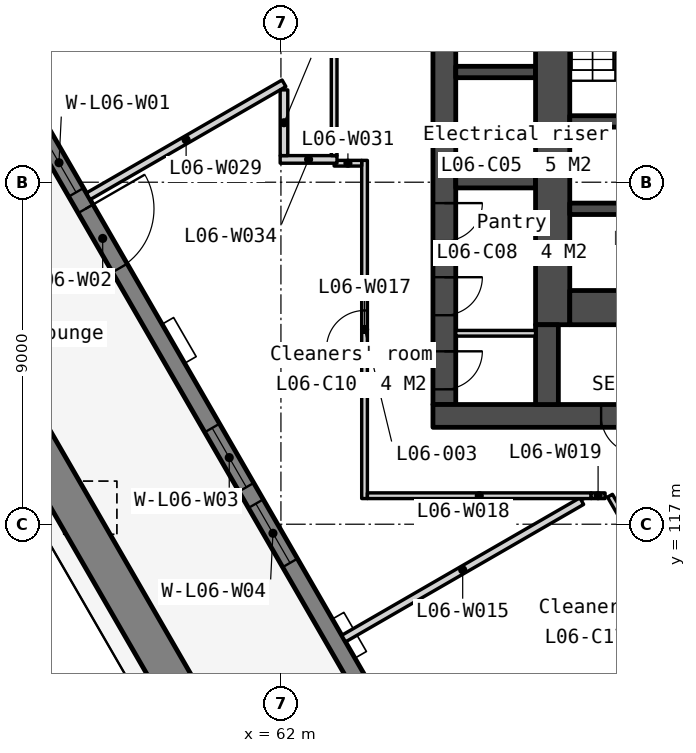
"""IFC4 building model, lengths in metres.
Left out: names, types, materials, properties, quantities, classifications, styles, units other than length and angle.
Written with IfcOpenShell. Run it as: python <this file> out.ifc"""

import sys

from ifc_helpers import new_model, si_unit, direction, frame, frame_2d, origin, place, context, subcontext, project, spatial, polyline, rectangle, outline, extrude, element, fill, save


model = new_model("IFC4")
c1 = context("Model", 3, precision=1e-05, world=origin(), true_north=direction((0.0, 1.0)))
c2 = subcontext(c1, "Body", "Model", "MODEL_VIEW")
j1 = project(units=[si_unit("LENGTHUNIT", "METRE"), si_unit("PLANEANGLEUNIT", "RADIAN")], contexts=[c1])
p1 = place(None, origin())
s1 = spatial("IfcSite", under=j1, at=p1, CompositionType="ELEMENT")
p2 = place(p1, origin())
s2 = spatial("IfcBuilding", under=s1, at=p2, CompositionType="ELEMENT")
p3 = place(p2, frame((0.0, 0.0, 35.0)))
s3 = spatial("IfcBuildingStorey", under=s2, at=p3, CompositionType="ELEMENT", Elevation=35.0)
p4 = place(p3, frame((66.3, 133.95, 0.0), z_axis=(0.0, 0.0, 1.0), x_axis=(0.0, -1.0, 0.0)))
e1 = element("IfcWall", 1, at=p4, inside=s3, PredefinedType="SOLIDWALL", context=c2, shape_type="SweptSolid", body=[
    extrude(rectangle(XDim=13.8, YDim=0.6, at=frame_2d((6.9, 0.0))), origin(), (0.0, 0.0, 1.0), 3.35),
])
p5 = place(p4, frame((0.6, 0.0, 0.0)))
e2 = element("IfcOpeningElement", 2, at=p5, cuts=e1, PredefinedType="OPENING", context=c2, shape_type="SweptSolid", body=[
    extrude(rectangle(XDim=1.1, YDim=2.1, at=frame_2d((0.55, 1.05))), frame((0.0, 0.31, 0.0), z_axis=(0.0, -1.0, 0.0), x_axis=(1.0, 0.0, 0.0)), (0.0, 0.0, 1.0), 0.62),
])
p6 = place(p4, frame((12.4, 0.0, 0.0)))
e3 = element("IfcOpeningElement", 3, at=p6, cuts=e1, PredefinedType="OPENING", context=c2, shape_type="SweptSolid", body=[
    extrude(rectangle(XDim=1.0, YDim=2.1, at=frame_2d((0.5, 1.05))), frame((0.0, 0.31, 0.0), z_axis=(0.0, -1.0, 0.0), x_axis=(1.0, 0.0, 0.0)), (0.0, 0.0, 1.0), 0.62),
])
p7 = place(p4, frame((8.5, 0.0, 0.0)))
e4 = element("IfcOpeningElement", 4, at=p7, cuts=e1, PredefinedType="OPENING", context=c2, shape_type="SweptSolid", body=[
    extrude(rectangle(XDim=1.0, YDim=2.1, at=frame_2d((0.5, 1.05))), frame((0.0, 0.31, 0.0), z_axis=(0.0, -1.0, 0.0), x_axis=(1.0, 0.0, 0.0)), (0.0, 0.0, 1.0), 0.62),
])
p8 = place(p4, frame((10.45, 0.0, 0.0)))
e5 = element("IfcOpeningElement", 5, at=p8, cuts=e1, PredefinedType="OPENING", context=c2, shape_type="SweptSolid", body=[
    extrude(rectangle(XDim=1.0, YDim=2.1, at=frame_2d((0.5, 1.05))), frame((0.0, 0.31, 0.0), z_axis=(0.0, -1.0, 0.0), x_axis=(1.0, 0.0, 0.0)), (0.0, 0.0, 1.0), 0.62),
])
p9 = place(p3, frame((66.0, 119.85, 0.0), z_axis=(0.0, 0.0, 1.0), x_axis=(1.0, 0.0, 0.0)))
e6 = element("IfcWall", 6, at=p9, inside=s3, PredefinedType="SOLIDWALL", context=c2, shape_type="SweptSolid", body=[
    extrude(rectangle(XDim=28.0, YDim=0.6, at=frame_2d((14.0, 0.0))), origin(), (0.0, 0.0, 1.0), 3.35),
])
p10 = place(p9, frame((6.825, 0.0, 0.0)))
e7 = element("IfcOpeningElement", 7, at=p10, cuts=e6, PredefinedType="OPENING", context=c2, shape_type="SweptSolid", body=[
    extrude(rectangle(XDim=1.8, YDim=2.1, at=frame_2d((0.9, 1.05))), frame((0.0, 0.31, 0.0), z_axis=(0.0, -1.0, 0.0), x_axis=(1.0, 0.0, 0.0)), (0.0, 0.0, 1.0), 0.62),
])
p11 = place(p9, frame((15.85, 0.0, 0.0)))
e8 = element("IfcOpeningElement", 8, at=p11, cuts=e6, PredefinedType="OPENING", context=c2, shape_type="SweptSolid", body=[
    extrude(rectangle(XDim=1.5, YDim=2.1, at=frame_2d((0.75, 1.05))), frame((0.0, 0.31, 0.0), z_axis=(0.0, -1.0, 0.0), x_axis=(1.0, 0.0, 0.0)), (0.0, 0.0, 1.0), 0.62),
])
p12 = place(p9, frame((19.375, 0.0, 0.0)))
e9 = element("IfcOpeningElement", 9, at=p12, cuts=e6, PredefinedType="OPENING", context=c2, shape_type="SweptSolid", body=[
    extrude(rectangle(XDim=1.8, YDim=2.1, at=frame_2d((0.9, 1.05))), frame((0.0, 0.31, 0.0), z_axis=(0.0, -1.0, 0.0), x_axis=(1.0, 0.0, 0.0)), (0.0, 0.0, 1.0), 0.62),
])
p13 = place(p9, frame((4.425, 0.0, 0.0)))
e10 = element("IfcOpeningElement", 10, at=p13, cuts=e6, PredefinedType="OPENING", context=c2, shape_type="SweptSolid", body=[
    extrude(rectangle(XDim=1.0, YDim=2.1, at=frame_2d((0.5, 1.05))), frame((0.0, 0.31, 0.0), z_axis=(0.0, -1.0, 0.0), x_axis=(1.0, 0.0, 0.0)), (0.0, 0.0, 1.0), 0.62),
])
p14 = place(p9, frame((9.925, 0.0, 0.0)))
e11 = element("IfcOpeningElement", 11, at=p14, cuts=e6, PredefinedType="OPENING", context=c2, shape_type="SweptSolid", body=[
    extrude(rectangle(XDim=1.0, YDim=2.1, at=frame_2d((0.5, 1.05))), frame((0.0, 0.31, 0.0), z_axis=(0.0, -1.0, 0.0), x_axis=(1.0, 0.0, 0.0)), (0.0, 0.0, 1.0), 0.62),
])
p15 = place(p9, frame((13.125, 0.0, 0.0)))
e12 = element("IfcOpeningElement", 12, at=p15, cuts=e6, PredefinedType="OPENING", context=c2, shape_type="SweptSolid", body=[
    extrude(rectangle(XDim=1.0, YDim=2.1, at=frame_2d((0.5, 1.05))), frame((0.0, 0.31, 0.0), z_axis=(0.0, -1.0, 0.0), x_axis=(1.0, 0.0, 0.0)), (0.0, 0.0, 1.0), 0.62),
])
p16 = place(p9, frame((21.725, 0.0, 0.0)))
e13 = element("IfcOpeningElement", 13, at=p16, cuts=e6, PredefinedType="OPENING", context=c2, shape_type="SweptSolid", body=[
    extrude(rectangle(XDim=1.0, YDim=2.1, at=frame_2d((0.5, 1.05))), frame((0.0, 0.31, 0.0), z_axis=(0.0, -1.0, 0.0), x_axis=(1.0, 0.0, 0.0)), (0.0, 0.0, 1.0), 0.62),
])
p17 = place(p9, frame((23.425, 0.0, 0.0)))
e14 = element("IfcOpeningElement", 14, at=p17, cuts=e6, PredefinedType="OPENING", context=c2, shape_type="SweptSolid", body=[
    extrude(rectangle(XDim=1.0, YDim=2.1, at=frame_2d((0.5, 1.05))), frame((0.0, 0.31, 0.0), z_axis=(0.0, -1.0, 0.0), x_axis=(1.0, 0.0, 0.0)), (0.0, 0.0, 1.0), 0.62),
])
p18 = place(p3, frame((66.6, 128.9, 0.0), z_axis=(0.0, 0.0, 1.0), x_axis=(1.0, 0.0, 0.0)))
e15 = element("IfcWall", 15, at=p18, inside=s3, PredefinedType="SOLIDWALL", context=c2, shape_type="SweptSolid", body=[
    extrude(rectangle(XDim=2.1, YDim=0.3, at=frame_2d((1.05, 0.0))), origin(), (0.0, 0.0, 1.0), 3.35),
])
p19 = place(p3, frame((66.6, 126.15, 0.0), z_axis=(0.0, 0.0, 1.0), x_axis=(1.0, 0.0, 0.0)))
e16 = element("IfcWall", 16, at=p19, inside=s3, PredefinedType="SOLIDWALL", context=c2, shape_type="SweptSolid", body=[
    extrude(rectangle(XDim=2.1, YDim=0.6, at=frame_2d((1.05, 0.0))), origin(), (0.0, 0.0, 1.0), 3.35),
])
for number, where, z_axis, x_axis in (
    (17, (66.6, 123.975, 0.0), (0.0, 0.0, 1.0), (1.0, 0.0, 0.0)),
    (18, (66.6, 122.025, 0.0), (0.0, 0.0, 1.0), (1.0, 0.0, 0.0)),
):
    element("IfcWall", number, at=place(p3, frame(where, z_axis=z_axis, x_axis=x_axis)), inside=s3, PredefinedType="PARTITIONING", context=c2, shape_type="SweptSolid", body=[
        extrude(rectangle(XDim=2.1, YDim=0.15, at=frame_2d((1.05, 0.0))), origin(), (0.0, 0.0, 1.0), 3.35),
    ])
p20 = place(p3, frame((69.15, 133.95, 0.0), z_axis=(0.0, 0.0, 1.0), x_axis=(0.0, -1.0, 0.0)))
e19 = element("IfcWall", 19, at=p20, inside=s3, PredefinedType="SOLIDWALL", context=c2, shape_type="SweptSolid", body=[
    extrude(rectangle(XDim=11.7, YDim=0.9, at=frame_2d((5.85, 0.0))), origin(), (0.0, 0.0, 1.0), 3.35),
])
p21 = place(p3, frame((69.0, 122.25, 0.0), z_axis=(0.0, 0.0, 1.0), x_axis=(0.0, -1.0, 0.0)))
e20 = element("IfcWall", 20, at=p21, inside=s3, PredefinedType="SOLIDWALL", context=c2, shape_type="SweptSolid", body=[
    extrude(rectangle(XDim=2.1, YDim=0.6, at=frame_2d((1.05, 0.0))), origin(), (0.0, 0.0, 1.0), 3.35),
])
for number, where, z_axis, x_axis in (
    (21, (69.6, 127.6, 0.0), (0.0, 0.0, 1.0), (1.0, 0.0, 0.0)),
    (22, (69.6, 125.3, 0.0), (0.0, 0.0, 1.0), (1.0, 0.0, 0.0)),
):
    element("IfcWall", number, at=place(p3, frame(where, z_axis=z_axis, x_axis=x_axis)), inside=s3, PredefinedType="SOLIDWALL", context=c2, shape_type="SweptSolid", body=[
        extrude(rectangle(XDim=2.55, YDim=0.3, at=frame_2d((1.275, 0.0))), origin(), (0.0, 0.0, 1.0), 3.35),
    ])
p22 = place(p3, frame((69.6, 122.7, 0.0), z_axis=(0.0, 0.0, 1.0), x_axis=(1.0, 0.0, 0.0)))
e23 = element("IfcWall", 23, at=p22, inside=s3, PredefinedType="SOLIDWALL", context=c2, shape_type="SweptSolid", body=[
    extrude(rectangle(XDim=2.55, YDim=0.9, at=frame_2d((1.275, 0.0))), origin(), (0.0, 0.0, 1.0), 3.35),
])
p23 = place(p3, frame((0.0, 0.0, -0.2)))
e24 = element("IfcWall", 24, at=p23, inside=s3, PredefinedType="SOLIDWALL", context=c2, shape_type="SweptSolid", body=[
    extrude(outline(polyline([(57.6, 135.0), (57.6, 134.55), (57.86, 134.55), (54.82, 129.284), (54.69, 129.509), (54.3, 129.284), (57.6, 135.0)])), origin(), (0.0, 0.0, 1.0), 3.55),
])
p24 = place(p3, frame((54.495, 129.397, -0.2), z_axis=(0.0, 0.0, 1.0), x_axis=(0.499999201451, -0.866025864826, 0.0)))
e25 = element("IfcWall", 25, at=p24, inside=s3, PredefinedType="SOLIDWALL", context=c2, shape_type="SweptSolid", body=[
    extrude(outline(polyline([(44.8, 0.0), (44.8, 3.55), (0.0, 3.55), (0.0, 0.0), (44.8, 0.0)])), frame((0.0, 0.225, 0.0), z_axis=(0.0, -1.0, 0.0), x_axis=(1.0, 0.0, 0.0)), (0.0, 0.0, 1.0), 0.45),
])
p25 = place(p24, frame((2.43, 0.0, 1.1)))
e26 = element("IfcOpeningElement", 26, at=p25, cuts=e25, PredefinedType="OPENING", context=c2, shape_type="SweptSolid", body=[
    extrude(rectangle(XDim=1.8, YDim=1.5, at=frame_2d((0.9, 0.75))), frame((0.0, 0.235, 0.0), z_axis=(0.0, -1.0, 0.0), x_axis=(1.0, 0.0, 0.0)), (0.0, 0.0, 1.0), 0.47),
])
p26 = place(p24, frame((4.73, 0.0, 0.2)))
e27 = element("IfcOpeningElement", 27, at=p26, cuts=e25, PredefinedType="OPENING", context=c2, shape_type="SweptSolid", body=[
    extrude(rectangle(XDim=1.8, YDim=2.4, at=frame_2d((0.9, 1.2))), frame((0.0, 0.235, 0.0), z_axis=(0.0, -1.0, 0.0), x_axis=(1.0, 0.0, 0.0)), (0.0, 0.0, 1.0), 0.47),
])
p27 = place(p24, frame((11.39, 0.0, 1.1)))
e28 = element("IfcOpeningElement", 28, at=p27, cuts=e25, PredefinedType="OPENING", context=c2, shape_type="SweptSolid", body=[
    extrude(rectangle(XDim=1.8, YDim=1.5, at=frame_2d((0.9, 0.75))), frame((0.0, 0.235, 0.0), z_axis=(0.0, -1.0, 0.0), x_axis=(1.0, 0.0, 0.0)), (0.0, 0.0, 1.0), 0.47),
])
p28 = place(p24, frame((13.69, 0.0, 1.1)))
e29 = element("IfcOpeningElement", 29, at=p28, cuts=e25, PredefinedType="OPENING", context=c2, shape_type="SweptSolid", body=[
    extrude(rectangle(XDim=1.8, YDim=1.5, at=frame_2d((0.9, 0.75))), frame((0.0, 0.235, 0.0), z_axis=(0.0, -1.0, 0.0), x_axis=(1.0, 0.0, 0.0)), (0.0, 0.0, 1.0), 0.47),
])
p29 = place(p24, frame((20.35, 0.0, 0.2)))
e30 = element("IfcOpeningElement", 30, at=p29, cuts=e25, PredefinedType="OPENING", context=c2, shape_type="SweptSolid", body=[
    extrude(rectangle(XDim=1.8, YDim=2.4, at=frame_2d((0.9, 1.2))), frame((0.0, 0.235, 0.0), z_axis=(0.0, -1.0, 0.0), x_axis=(1.0, 0.0, 0.0)), (0.0, 0.0, 1.0), 0.47),
])
p30 = place(p24, frame((22.65, 0.0, 1.1)))
e31 = element("IfcOpeningElement", 31, at=p30, cuts=e25, PredefinedType="OPENING", context=c2, shape_type="SweptSolid", body=[
    extrude(rectangle(XDim=1.8, YDim=1.5, at=frame_2d((0.9, 0.75))), frame((0.0, 0.235, 0.0), z_axis=(0.0, -1.0, 0.0), x_axis=(1.0, 0.0, 0.0)), (0.0, 0.0, 1.0), 0.47),
])
p31 = place(p24, frame((29.31, 0.0, 1.1)))
e32 = element("IfcOpeningElement", 32, at=p31, cuts=e25, PredefinedType="OPENING", context=c2, shape_type="SweptSolid", body=[
    extrude(rectangle(XDim=1.8, YDim=1.5, at=frame_2d((0.9, 0.75))), frame((0.0, 0.235, 0.0), z_axis=(0.0, -1.0, 0.0), x_axis=(1.0, 0.0, 0.0)), (0.0, 0.0, 1.0), 0.47),
])
p32 = place(p24, frame((31.61, 0.0, 0.2)))
e33 = element("IfcOpeningElement", 33, at=p32, cuts=e25, PredefinedType="OPENING", context=c2, shape_type="SweptSolid", body=[
    extrude(rectangle(XDim=1.8, YDim=2.4, at=frame_2d((0.9, 1.2))), frame((0.0, 0.235, 0.0), z_axis=(0.0, -1.0, 0.0), x_axis=(1.0, 0.0, 0.0)), (0.0, 0.0, 1.0), 0.47),
])
p33 = place(p24, frame((38.27, 0.0, 1.1)))
e34 = element("IfcOpeningElement", 34, at=p33, cuts=e25, PredefinedType="OPENING", context=c2, shape_type="SweptSolid", body=[
    extrude(rectangle(XDim=1.8, YDim=1.5, at=frame_2d((0.9, 0.75))), frame((0.0, 0.235, 0.0), z_axis=(0.0, -1.0, 0.0), x_axis=(1.0, 0.0, 0.0)), (0.0, 0.0, 1.0), 0.47),
])
p34 = place(p24, frame((40.57, 0.0, 1.1)))
e35 = element("IfcOpeningElement", 35, at=p34, cuts=e25, PredefinedType="OPENING", context=c2, shape_type="SweptSolid", body=[
    extrude(rectangle(XDim=1.8, YDim=1.5, at=frame_2d((0.9, 0.75))), frame((0.0, 0.235, 0.0), z_axis=(0.0, -1.0, 0.0), x_axis=(1.0, 0.0, 0.0)), (0.0, 0.0, 1.0), 0.47),
])
p35 = place(p3, frame((77.166, 81.679, 0.0), z_axis=(0.0, 0.0, 1.0), x_axis=(-0.500001932243, 0.8660242882, 0.0)))
e36 = element("IfcWall", 36, at=p35, inside=s3, PredefinedType="STANDARD", context=c2, shape_type="SweptSolid", body=[
    extrude(rectangle(XDim=54.747, YDim=1.0, at=frame_2d((27.374, 0.0))), origin(), (0.0, 0.0, 1.0), 0.6),
])
p36 = place(p3, frame((0.0, 0.0, 0.04)))
e37 = element("IfcWall", 37, at=p36, inside=s3, PredefinedType="SOLIDWALL", context=c2, shape_type="SweptSolid", body=[
    extrude(outline(polyline([(57.6, 135.0), (52.545, 134.141), (54.3, 129.284), (57.6, 135.0)])), origin(), (0.0, 0.0, 1.0), 3.31),
])
p37 = place(p3, frame((70.659, 117.75, 0.0), z_axis=(0.0, 0.0, 1.0), x_axis=(0.500015174863, -0.866016642396, 0.0)))
e38 = element("IfcWall", 38, at=p37, inside=s3, PredefinedType="PARTITIONING", context=c2, shape_type="SweptSolid", body=[
    extrude(rectangle(XDim=8.712, YDim=0.15, at=frame_2d((4.356, 0.0))), origin(), (0.0, 0.0, 1.0), 3.35),
])
p38 = place(p37, frame((3.856, 0.0, 0.0)))
e39 = element("IfcOpeningElement", 39, at=p38, cuts=e38, PredefinedType="OPENING", context=c2, shape_type="SweptSolid", body=[
    extrude(rectangle(XDim=1.0, YDim=2.1, at=frame_2d((0.5, 1.05))), frame((0.0, 0.085, 0.0), z_axis=(0.0, -1.0, 0.0), x_axis=(1.0, 0.0, 0.0)), (0.0, 0.0, 1.0), 0.17),
])
p39 = place(p3, frame((63.65, 113.99, 0.0), z_axis=(0.0, 0.0, 1.0), x_axis=(0.866027117883, 0.499997031082, 0.0)))
e40 = element("IfcWall", 40, at=p39, inside=s3, PredefinedType="PARTITIONING", context=c2, shape_type="SweptSolid", body=[
    extrude(rectangle(XDim=7.235, YDim=0.2, at=frame_2d((3.617, 0.0))), origin(), (0.0, 0.0, 1.0), 3.35),
])
p40 = place(p3, frame((64.2, 117.675, 0.0), z_axis=(0.0, 0.0, 1.0), x_axis=(0.0, 1.0, 0.0)))
e41 = element("IfcWall", 41, at=p40, inside=s3, PredefinedType="PARTITIONING", context=c2, shape_type="SweptSolid", body=[
    extrude(rectangle(XDim=8.9, YDim=0.15, at=frame_2d((4.45, 0.0))), origin(), (0.0, 0.0, 1.0), 3.35),
])
p41 = place(p40, frame((3.95, 0.0, 0.0)))
e42 = element("IfcOpeningElement", 42, at=p41, cuts=e41, PredefinedType="OPENING", context=c2, shape_type="SweptSolid", body=[
    extrude(rectangle(XDim=1.0, YDim=2.1, at=frame_2d((0.5, 1.05))), frame((0.0, 0.085, 0.0), z_axis=(0.0, -1.0, 0.0), x_axis=(1.0, 0.0, 0.0)), (0.0, 0.0, 1.0), 0.17),
])
p42 = place(p3, frame((64.275, 117.75, 0.0), z_axis=(0.0, 0.0, 1.0), x_axis=(1.0, 0.0, 0.0)))
e43 = element("IfcWall", 43, at=p42, inside=s3, PredefinedType="PARTITIONING", context=c2, shape_type="SweptSolid", body=[
    extrude(rectangle(XDim=5.887, YDim=0.15, at=frame_2d((2.944, 0.0))), origin(), (0.0, 0.0, 1.0), 3.35),
])
p43 = place(p3, frame((70.162, 117.75, 0.0), z_axis=(0.0, 0.0, 1.0), x_axis=(1.0, 0.0, 0.0)))
e44 = element("IfcWall", 44, at=p43, inside=s3, PredefinedType="PARTITIONING", context=c2, shape_type="SweptSolid", body=[
    extrude(rectangle(XDim=0.367, YDim=0.15, at=frame_2d((0.183, 0.0))), origin(), (0.0, 0.0, 1.0), 3.35),
])
p44 = place(p3, frame((56.93, 125.629, 0.0), z_axis=(0.0, 0.0, 1.0), x_axis=(0.866021515814, 0.500006734102, 0.0)))
e45 = element("IfcWall", 45, at=p44, inside=s3, PredefinedType="PARTITIONING", context=c2, shape_type="SweptSolid", body=[
    extrude(rectangle(XDim=5.947, YDim=0.2, at=frame_2d((2.974, 0.0))), origin(), (0.0, 0.0, 1.0), 3.35),
])
p45 = place(p3, frame((63.4, 126.5, 0.0), z_axis=(0.0, 0.0, 1.0), x_axis=(1.0, 0.0, 0.0)))
e46 = element("IfcWall", 46, at=p45, inside=s3, PredefinedType="PARTITIONING", context=c2, shape_type="SweptSolid", body=[
    extrude(rectangle(XDim=0.725, YDim=0.15, at=frame_2d((0.363, 0.0))), origin(), (0.0, 0.0, 1.0), 3.35),
])
p46 = place(p3, frame((61.98, 126.6, 0.0), z_axis=(0.0, 0.0, 1.0), x_axis=(1.0, 0.0, 0.0)))
e47 = element("IfcWall", 47, at=p46, inside=s3, PredefinedType="PARTITIONING", context=c2, shape_type="SweptSolid", body=[
    extrude(rectangle(XDim=1.495, YDim=0.2, at=frame_2d((0.748, 0.0))), origin(), (0.0, 0.0, 1.0), 3.35),
])
p47 = place(p3, frame((63.4, 126.7, 0.0), z_axis=(0.0, 0.0, 1.0), x_axis=(0.0, 1.0, 0.0)))
e48 = element("IfcWall", 48, at=p47, inside=s3, PredefinedType="PARTITIONING", context=c2, shape_type="SweptSolid", body=[
    extrude(rectangle(XDim=7.375, YDim=0.15, at=frame_2d((3.687, 0.0))), origin(), (0.0, 0.0, 1.0), 3.35),
])
p48 = place(p47, frame((3.187, 0.0, 0.0)))
e49 = element("IfcOpeningElement", 49, at=p48, cuts=e48, PredefinedType="OPENING", context=c2, shape_type="SweptSolid", body=[
    extrude(rectangle(XDim=1.0, YDim=2.1, at=frame_2d((0.5, 1.05))), frame((0.0, 0.085, 0.0), z_axis=(0.0, -1.0, 0.0), x_axis=(1.0, 0.0, 0.0)), (0.0, 0.0, 1.0), 0.17),
])
p49 = place(p3, frame((62.08, 126.7, 0.0), z_axis=(0.0, 0.0, 1.0), x_axis=(0.0, 1.0, 0.0)))
e50 = element("IfcWall", 50, at=p49, inside=s3, PredefinedType="PARTITIONING", context=c2, shape_type="SweptSolid", body=[
    extrude(rectangle(XDim=1.73, YDim=0.2, at=frame_2d((0.865, 0.0))), origin(), (0.0, 0.0, 1.0), 3.35),
])
p50 = place(p13, origin())
e51 = element("IfcDoor", 51, at=p50, inside=s3, OperationType="SINGLE_SWING_RIGHT", PredefinedType="DOOR", context=c2, shape_type="SweptSolid", body=[
    extrude(rectangle(XDim=1.0, YDim=2.1, at=frame_2d((0.5, 1.05))), frame((0.0, 0.025, 0.0), z_axis=(0.0, -1.0, 0.0), x_axis=(1.0, 0.0, 0.0)), (0.0, 0.0, 1.0), 0.05),
])
fill(e10, e51)
p51 = place(p6, origin())
e52 = element("IfcDoor", 52, at=p51, inside=s3, OperationType="SINGLE_SWING_LEFT", PredefinedType="DOOR", context=c2, shape_type="SweptSolid", body=[
    extrude(rectangle(XDim=1.0, YDim=2.1, at=frame_2d((0.5, 1.05))), frame((0.0, 0.025, 0.0), z_axis=(0.0, -1.0, 0.0), x_axis=(1.0, 0.0, 0.0)), (0.0, 0.0, 1.0), 0.05),
])
fill(e3, e52)
p52 = place(p7, origin())
e53 = element("IfcDoor", 53, at=p52, inside=s3, OperationType="SINGLE_SWING_LEFT", PredefinedType="DOOR", context=c2, shape_type="SweptSolid", body=[
    extrude(rectangle(XDim=1.0, YDim=2.1, at=frame_2d((0.5, 1.05))), frame((0.0, 0.025, 0.0), z_axis=(0.0, -1.0, 0.0), x_axis=(1.0, 0.0, 0.0)), (0.0, 0.0, 1.0), 0.05),
])
fill(e4, e53)
p53 = place(p8, origin())
e54 = element("IfcDoor", 54, at=p53, inside=s3, OperationType="SINGLE_SWING_LEFT", PredefinedType="DOOR", context=c2, shape_type="SweptSolid", body=[
    extrude(rectangle(XDim=1.0, YDim=2.1, at=frame_2d((0.5, 1.05))), frame((0.0, 0.025, 0.0), z_axis=(0.0, -1.0, 0.0), x_axis=(1.0, 0.0, 0.0)), (0.0, 0.0, 1.0), 0.05),
])
fill(e5, e54)
p54 = place(p25, origin())
e55 = element("IfcWindow", 55, at=p54, inside=s3, PartitioningType="SINGLE_PANEL", PredefinedType="WINDOW", context=c2, shape_type="SweptSolid", body=[
    extrude(rectangle(XDim=1.8, YDim=1.5, at=frame_2d((0.9, 0.75))), frame((0.0, 0.03, 0.0), z_axis=(0.0, -1.0, 0.0), x_axis=(1.0, 0.0, 0.0)), (0.0, 0.0, 1.0), 0.06),
])
fill(e26, e55)
p55 = place(p26, origin())
e56 = element("IfcDoor", 56, at=p55, inside=s3, OperationType="SINGLE_SWING_LEFT", PredefinedType="DOOR", context=c2, shape_type="SweptSolid", body=[
    extrude(rectangle(XDim=1.8, YDim=2.4, at=frame_2d((0.9, 1.2))), frame((0.0, 0.025, 0.0), z_axis=(0.0, -1.0, 0.0), x_axis=(1.0, 0.0, 0.0)), (0.0, 0.0, 1.0), 0.05),
])
fill(e27, e56)
p56 = place(p27, origin())
e57 = element("IfcWindow", 57, at=p56, inside=s3, PartitioningType="SINGLE_PANEL", PredefinedType="WINDOW", context=c2, shape_type="SweptSolid", body=[
    extrude(rectangle(XDim=1.8, YDim=1.5, at=frame_2d((0.9, 0.75))), frame((0.0, 0.03, 0.0), z_axis=(0.0, -1.0, 0.0), x_axis=(1.0, 0.0, 0.0)), (0.0, 0.0, 1.0), 0.06),
])
fill(e28, e57)
p57 = place(p28, origin())
e58 = element("IfcWindow", 58, at=p57, inside=s3, PartitioningType="SINGLE_PANEL", PredefinedType="WINDOW", context=c2, shape_type="SweptSolid", body=[
    extrude(rectangle(XDim=1.8, YDim=1.5, at=frame_2d((0.9, 0.75))), frame((0.0, 0.03, 0.0), z_axis=(0.0, -1.0, 0.0), x_axis=(1.0, 0.0, 0.0)), (0.0, 0.0, 1.0), 0.06),
])
fill(e29, e58)
p58 = place(p41, origin())
e59 = element("IfcDoor", 59, at=p58, inside=s3, OperationType="SINGLE_SWING_LEFT", PredefinedType="DOOR", context=c2, shape_type="SweptSolid", body=[
    extrude(rectangle(XDim=1.0, YDim=2.1, at=frame_2d((0.5, 1.05))), frame((0.0, 0.025, 0.0), z_axis=(0.0, -1.0, 0.0), x_axis=(1.0, 0.0, 0.0)), (0.0, 0.0, 1.0), 0.05),
])
fill(e42, e59)
save(model, sys.argv[1])
